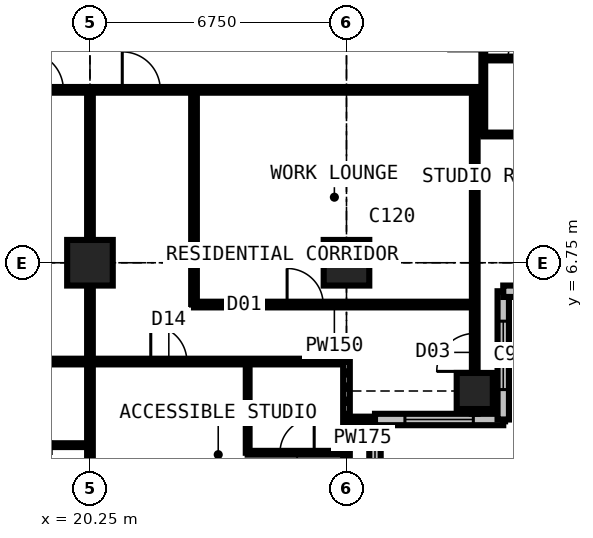
"""IFC4 building model, lengths in metres.
Left out: names, types, materials, properties, quantities, classifications, styles, units other than length and angle.
Written with IfcOpenShell. Run it as: python <this file> out.ifc"""

import sys

from ifc_helpers import new_model, si_unit, direction, frame, frame_2d, origin, origin_2d, place, context, subcontext, project, spatial, rectangle, extrude, element, fill, save


model = new_model("IFC4")
c1 = context("Model", 3, precision=1e-05, world=origin(), true_north=direction((0.0, 1.0)))
c2 = subcontext(c1, "Body", "Model", "MODEL_VIEW")
j1 = project(units=[si_unit("LENGTHUNIT", "METRE"), si_unit("PLANEANGLEUNIT", "RADIAN")], contexts=[c1])
p1 = place(None, origin())
s1 = spatial("IfcSite", under=j1, at=p1, CompositionType="ELEMENT")
p2 = place(p1, origin())
s2 = spatial("IfcBuilding", under=s1, at=p2, CompositionType="ELEMENT")
p3 = place(p2, frame((0.0, 0.0, 174.6)))
s3 = spatial("IfcBuildingStorey", under=s2, at=p3, CompositionType="ELEMENT", Elevation=174.6)
for number, where, z_axis, x_axis in (
    (1, (20.25, 6.75, 0.0), (0.0, 0.0, 1.0), (1.0, 0.0, 0.0)),
    (2, (27.0, 6.75, 0.0), (0.0, 0.0, 1.0), (1.0, 0.0, 0.0)),
):
    element("IfcColumn", number, at=place(p3, frame(where, z_axis=z_axis, x_axis=x_axis)), inside=s3, PredefinedType="COLUMN", context=c2, shape_type="SweptSolid", body=[
        extrude(rectangle(XDim=1.2, YDim=1.2, at=origin_2d()), origin(), (0.0, 0.0, 1.0), 3.6),
    ])
p4 = place(p3, frame((30.375, 3.375, 0.0), z_axis=(0.0, 0.0, 1.0), x_axis=(1.0, 0.0, 0.0)))
e3 = element("IfcColumn", 3, at=p4, inside=s3, PredefinedType="COLUMN", context=c2, shape_type="SweptSolid", body=[
    extrude(rectangle(XDim=0.95, YDim=0.95, at=origin_2d()), origin(), (0.0, 0.0, 1.0), 3.6),
])
p5 = place(p3, frame((27.75, -0.75, 0.0), z_axis=(0.0, 0.0, 1.0), x_axis=(0.0, 1.0, 0.0)))
e4 = element("IfcWall", 4, at=p5, inside=s3, PredefinedType="SOLIDWALL", context=c2, shape_type="SweptSolid", body=[
    extrude(rectangle(XDim=3.375, YDim=0.3, at=frame_2d((1.688, 0.0))), origin(), (0.0, 0.0, 1.0), 3.375),
])
p6 = place(p5, frame((0.788, 0.0, 0.6)))
e5 = element("IfcOpeningElement", 5, at=p6, cuts=e4, PredefinedType="OPENING", context=c2, shape_type="SweptSolid", body=[
    extrude(rectangle(XDim=1.8, YDim=2.1, at=frame_2d((0.9, 1.05))), frame((0.0, 0.16, 0.0), z_axis=(0.0, -1.0, 0.0), x_axis=(1.0, 0.0, 0.0)), (0.0, 0.0, 1.0), 0.32),
])
p7 = place(p3, frame((27.75, 2.625, 0.0), z_axis=(0.0, 0.0, 1.0), x_axis=(1.0, 0.0, 0.0)))
e6 = element("IfcWall", 6, at=p7, inside=s3, PredefinedType="SOLIDWALL", context=c2, shape_type="SweptSolid", body=[
    extrude(rectangle(XDim=3.375, YDim=0.3, at=frame_2d((1.688, 0.0))), origin(), (0.0, 0.0, 1.0), 3.375),
])
p8 = place(p7, frame((0.788, 0.0, 0.6)))
e7 = element("IfcOpeningElement", 7, at=p8, cuts=e6, PredefinedType="OPENING", context=c2, shape_type="SweptSolid", body=[
    extrude(rectangle(XDim=1.8, YDim=2.1, at=frame_2d((0.9, 1.05))), frame((0.0, 0.16, 0.0), z_axis=(0.0, -1.0, 0.0), x_axis=(1.0, 0.0, 0.0)), (0.0, 0.0, 1.0), 0.32),
])
p9 = place(p3, frame((31.125, 2.625, 0.0), z_axis=(0.0, 0.0, 1.0), x_axis=(0.0, 1.0, 0.0)))
e8 = element("IfcWall", 8, at=p9, inside=s3, PredefinedType="SOLIDWALL", context=c2, shape_type="SweptSolid", body=[
    extrude(rectangle(XDim=3.375, YDim=0.3, at=frame_2d((1.688, 0.0))), origin(), (0.0, 0.0, 1.0), 3.375),
])
p10 = place(p9, frame((0.788, 0.0, 0.6)))
e9 = element("IfcOpeningElement", 9, at=p10, cuts=e8, PredefinedType="OPENING", context=c2, shape_type="SweptSolid", body=[
    extrude(rectangle(XDim=1.8, YDim=2.1, at=frame_2d((0.9, 1.05))), frame((0.0, 0.16, 0.0), z_axis=(0.0, -1.0, 0.0), x_axis=(1.0, 0.0, 0.0)), (0.0, 0.0, 1.0), 0.32),
])
p11 = place(p3, frame((31.125, 6.0, 0.0), z_axis=(0.0, 0.0, 1.0), x_axis=(1.0, 0.0, 0.0)))
e10 = element("IfcWall", 10, at=p11, inside=s3, PredefinedType="SOLIDWALL", context=c2, shape_type="SweptSolid", body=[
    extrude(rectangle(XDim=3.375, YDim=0.3, at=frame_2d((1.688, 0.0))), origin(), (0.0, 0.0, 1.0), 3.375),
])
p12 = place(p11, frame((0.788, 0.0, 0.6)))
e11 = element("IfcOpeningElement", 11, at=p12, cuts=e10, PredefinedType="OPENING", context=c2, shape_type="SweptSolid", body=[
    extrude(rectangle(XDim=1.8, YDim=2.1, at=frame_2d((0.9, 1.05))), frame((0.0, 0.16, 0.0), z_axis=(0.0, -1.0, 0.0), x_axis=(1.0, 0.0, 0.0)), (0.0, 0.0, 1.0), 0.32),
])
p13 = place(p3, frame((6.75, 4.15, 0.0), z_axis=(0.0, 0.0, 1.0), x_axis=(1.0, 0.0, 0.0)))
e12 = element("IfcWall", 12, at=p13, inside=s3, PredefinedType="PARTITIONING", context=c2, shape_type="SweptSolid", body=[
    extrude(rectangle(XDim=20.25, YDim=0.15, at=frame_2d((10.125, 0.0))), origin(), (0.0, 0.0, 1.0), 3.375),
])
p14 = place(p13, frame((1.2, 0.0, 0.0)))
e13 = element("IfcOpeningElement", 13, at=p14, cuts=e12, PredefinedType="OPENING", context=c2, shape_type="SweptSolid", body=[
    extrude(rectangle(XDim=1.0, YDim=2.2, at=frame_2d((0.5, 1.1))), frame((0.0, 0.085, 0.0), z_axis=(0.0, -1.0, 0.0), x_axis=(1.0, 0.0, 0.0)), (0.0, 0.0, 1.0), 0.17),
])
p15 = place(p13, frame((3.575, 0.0, 0.0)))
e14 = element("IfcOpeningElement", 14, at=p15, cuts=e12, PredefinedType="OPENING", context=c2, shape_type="SweptSolid", body=[
    extrude(rectangle(XDim=0.95, YDim=2.2, at=frame_2d((0.475, 1.1))), frame((0.0, 0.085, 0.0), z_axis=(0.0, -1.0, 0.0), x_axis=(1.0, 0.0, 0.0)), (0.0, 0.0, 1.0), 0.17),
])
p16 = place(p13, frame((7.0, 0.0, 0.0)))
e15 = element("IfcOpeningElement", 15, at=p16, cuts=e12, PredefinedType="OPENING", context=c2, shape_type="SweptSolid", body=[
    extrude(rectangle(XDim=0.95, YDim=2.2, at=frame_2d((0.475, 1.1))), frame((0.0, 0.085, 0.0), z_axis=(0.0, -1.0, 0.0), x_axis=(1.0, 0.0, 0.0)), (0.0, 0.0, 1.0), 0.17),
])
p17 = place(p13, frame((10.375, 0.0, 0.0)))
e16 = element("IfcOpeningElement", 16, at=p17, cuts=e12, PredefinedType="OPENING", context=c2, shape_type="SweptSolid", body=[
    extrude(rectangle(XDim=0.95, YDim=2.2, at=frame_2d((0.475, 1.1))), frame((0.0, 0.085, 0.0), z_axis=(0.0, -1.0, 0.0), x_axis=(1.0, 0.0, 0.0)), (0.0, 0.0, 1.0), 0.17),
])
p18 = place(p13, frame((15.1, 0.0, 0.0)))
e17 = element("IfcOpeningElement", 17, at=p18, cuts=e12, PredefinedType="OPENING", context=c2, shape_type="SweptSolid", body=[
    extrude(rectangle(XDim=0.95, YDim=2.2, at=frame_2d((0.475, 1.1))), frame((0.0, 0.085, 0.0), z_axis=(0.0, -1.0, 0.0), x_axis=(1.0, 0.0, 0.0)), (0.0, 0.0, 1.0), 0.17),
])
p19 = place(p3, frame((10.125, 11.3, 0.0), z_axis=(0.0, 0.0, 1.0), x_axis=(1.0, 0.0, 0.0)))
e18 = element("IfcWall", 18, at=p19, inside=s3, PredefinedType="PARTITIONING", context=c2, shape_type="SweptSolid", body=[
    extrude(rectangle(XDim=20.475, YDim=0.15, at=frame_2d((10.238, 0.0))), origin(), (0.0, 0.0, 1.0), 3.375),
])
p20 = place(p19, frame((8.425, 0.0, 0.0)))
e19 = element("IfcOpeningElement", 19, at=p20, cuts=e18, PredefinedType="OPENING", context=c2, shape_type="SweptSolid", body=[
    extrude(rectangle(XDim=1.0, YDim=2.2, at=frame_2d((0.5, 1.1))), frame((0.0, 0.085, 0.0), z_axis=(0.0, -1.0, 0.0), x_axis=(1.0, 0.0, 0.0)), (0.0, 0.0, 1.0), 0.17),
])
p21 = place(p19, frame((10.975, 0.0, 0.0)))
e20 = element("IfcOpeningElement", 20, at=p21, cuts=e18, PredefinedType="OPENING", context=c2, shape_type="SweptSolid", body=[
    extrude(rectangle(XDim=1.0, YDim=2.2, at=frame_2d((0.5, 1.1))), frame((0.0, 0.085, 0.0), z_axis=(0.0, -1.0, 0.0), x_axis=(1.0, 0.0, 0.0)), (0.0, 0.0, 1.0), 0.17),
])
p22 = place(p19, frame((4.875, 0.0, 0.0)))
e21 = element("IfcOpeningElement", 21, at=p22, cuts=e18, PredefinedType="OPENING", context=c2, shape_type="SweptSolid", body=[
    extrude(rectangle(XDim=0.95, YDim=2.2, at=frame_2d((0.475, 1.1))), frame((0.0, 0.085, 0.0), z_axis=(0.0, -1.0, 0.0), x_axis=(1.0, 0.0, 0.0)), (0.0, 0.0, 1.0), 0.17),
])
p23 = place(p3, frame((18.25, 1.95, 0.0), z_axis=(0.0, 0.0, 1.0), x_axis=(1.0, 0.0, 0.0)))
e22 = element("IfcWall", 22, at=p23, inside=s3, PredefinedType="PARTITIONING", context=c2, shape_type="SweptSolid", body=[
    extrude(rectangle(XDim=2.0, YDim=0.1, at=frame_2d((1.0, 0.0))), origin(), (0.0, 0.0, 1.0), 3.375),
])
p24 = place(p3, frame((20.25, -0.734, 0.0), z_axis=(0.0, 0.0, 1.0), x_axis=(0.0, 1.0, 0.0)))
e23 = element("IfcWall", 23, at=p24, inside=s3, PredefinedType="PARTITIONING", context=c2, shape_type="SweptSolid", body=[
    extrude(rectangle(XDim=12.034, YDim=0.15, at=frame_2d((6.017, 0.0))), origin(), (0.0, 0.0, 1.0), 2.61),
])
p25 = place(p3, frame((22.988, 5.65, 0.0), z_axis=(0.0, 0.0, 1.0), x_axis=(1.0, 0.0, 0.0)))
e24 = element("IfcWall", 24, at=p25, inside=s3, PredefinedType="PARTITIONING", context=c2, shape_type="SweptSolid", body=[
    extrude(rectangle(XDim=7.387, YDim=0.15, at=frame_2d((3.694, 0.0))), origin(), (0.0, 0.0, 1.0), 3.375),
])
p26 = place(p25, frame((2.45, 0.0, 0.0)))
e25 = element("IfcOpeningElement", 25, at=p26, cuts=e24, PredefinedType="OPENING", context=c2, shape_type="SweptSolid", body=[
    extrude(rectangle(XDim=0.95, YDim=2.2, at=frame_2d((0.475, 1.1))), frame((0.0, 0.085, 0.0), z_axis=(0.0, -1.0, 0.0), x_axis=(1.0, 0.0, 0.0)), (0.0, 0.0, 1.0), 0.17),
])
p27 = place(p3, frame((22.988, 5.65, 0.0), z_axis=(0.0, 0.0, 1.0), x_axis=(0.0, 1.0, 0.0)))
e26 = element("IfcWall", 26, at=p27, inside=s3, PredefinedType="PARTITIONING", context=c2, shape_type="SweptSolid", body=[
    extrude(rectangle(XDim=5.65, YDim=0.15, at=frame_2d((2.825, 0.0))), origin(), (0.0, 0.0, 1.0), 3.375),
])
p28 = place(p3, frame((24.4, 1.75, 0.0), z_axis=(0.0, 0.0, 1.0), x_axis=(0.0, 1.0, 0.0)))
e27 = element("IfcWall", 27, at=p28, inside=s3, PredefinedType="PARTITIONING", context=c2, shape_type="SweptSolid", body=[
    extrude(rectangle(XDim=2.4, YDim=0.1, at=frame_2d((1.2, 0.0))), origin(), (0.0, 0.0, 1.0), 3.375),
])
p29 = place(p3, frame((24.4, 1.75, 0.0), z_axis=(0.0, 0.0, 1.0), x_axis=(1.0, 0.0, 0.0)))
e28 = element("IfcWall", 28, at=p29, inside=s3, PredefinedType="PARTITIONING", context=c2, shape_type="SweptSolid", body=[
    extrude(rectangle(XDim=2.6, YDim=0.1, at=frame_2d((1.3, 0.0))), origin(), (0.0, 0.0, 1.0), 3.375),
])
p30 = place(p29, frame((0.85, 0.0, 0.0)))
e29 = element("IfcOpeningElement", 29, at=p30, cuts=e28, PredefinedType="OPENING", context=c2, shape_type="SweptSolid", body=[
    extrude(rectangle(XDim=0.9, YDim=2.2, at=frame_2d((0.45, 1.1))), frame((0.0, 0.06, 0.0), z_axis=(0.0, -1.0, 0.0), x_axis=(1.0, 0.0, 0.0)), (0.0, 0.0, 1.0), 0.12),
])
p31 = place(p3, frame((27.0, -0.734, 0.0), z_axis=(0.0, 0.0, 1.0), x_axis=(0.0, 1.0, 0.0)))
e30 = element("IfcWall", 30, at=p31, inside=s3, PredefinedType="PARTITIONING", context=c2, shape_type="SweptSolid", body=[
    extrude(rectangle(XDim=4.884, YDim=0.175, at=frame_2d((2.442, 0.0))), origin(), (0.0, 0.0, 1.0), 2.877),
])
p32 = place(p3, frame((27.0, 2.625, 0.0), z_axis=(0.0, 0.0, 1.0), x_axis=(1.0, 0.0, 0.0)))
e31 = element("IfcWall", 31, at=p32, inside=s3, PredefinedType="PARTITIONING", context=c2, shape_type="SweptSolid", body=[
    extrude(rectangle(XDim=0.734, YDim=0.15, at=frame_2d((0.367, 0.0))), origin(), (0.0, 0.0, 1.0), 3.375),
])
p33 = place(p3, frame((30.375, 2.775, 0.0), z_axis=(0.0, 0.0, 1.0), x_axis=(0.0, 1.0, 0.0)))
e32 = element("IfcWall", 32, at=p33, inside=s3, PredefinedType="PARTITIONING", context=c2, shape_type="SweptSolid", body=[
    extrude(rectangle(XDim=8.525, YDim=0.15, at=frame_2d((4.263, 0.0))), origin(), (0.0, 0.0, 1.0), 2.877),
])
p34 = place(p33, frame((1.116, 0.0, 0.0)))
e33 = element("IfcOpeningElement", 33, at=p34, cuts=e32, PredefinedType="OPENING", context=c2, shape_type="SweptSolid", body=[
    extrude(rectangle(XDim=1.0, YDim=2.2, at=frame_2d((0.5, 1.1))), frame((0.0, 0.085, 0.0), z_axis=(0.0, -1.0, 0.0), x_axis=(1.0, 0.0, 0.0)), (0.0, 0.0, 1.0), 0.17),
])
p35 = place(p3, frame((30.6, 10.125, 0.0), z_axis=(0.0, 0.0, 1.0), x_axis=(0.0, 1.0, 0.0)))
e34 = element("IfcWall", 34, at=p35, inside=s3, PredefinedType="PARTITIONING", context=c2, shape_type="SweptSolid", body=[
    extrude(rectangle(XDim=3.375, YDim=0.1, at=frame_2d((1.688, 0.0))), origin(), (0.0, 0.0, 1.0), 3.375),
])
p36 = place(p35, frame((2.2, 0.0, 0.0)))
e35 = element("IfcOpeningElement", 35, at=p36, cuts=e34, PredefinedType="OPENING", context=c2, shape_type="SweptSolid", body=[
    extrude(rectangle(XDim=0.95, YDim=2.2, at=frame_2d((0.475, 1.1))), frame((0.0, 0.06, 0.0), z_axis=(0.0, -1.0, 0.0), x_axis=(1.0, 0.0, 0.0)), (0.0, 0.0, 1.0), 0.12),
])
p37 = place(p3, frame((30.6, 10.125, 0.0), z_axis=(0.0, 0.0, 1.0), x_axis=(1.0, 0.0, 0.0)))
e36 = element("IfcWall", 36, at=p37, inside=s3, PredefinedType="PARTITIONING", context=c2, shape_type="SweptSolid", body=[
    extrude(rectangle(XDim=3.884, YDim=0.1, at=frame_2d((1.942, 0.0))), origin(), (0.0, 0.0, 1.0), 3.375),
])
p38 = place(p3, frame((30.6, 12.125, 0.0), z_axis=(0.0, 0.0, 1.0), x_axis=(1.0, 0.0, 0.0)))
e37 = element("IfcWall", 37, at=p38, inside=s3, PredefinedType="PARTITIONING", context=c2, shape_type="SweptSolid", body=[
    extrude(rectangle(XDim=2.2, YDim=0.1, at=frame_2d((1.1, 0.0))), origin(), (0.0, 0.0, 1.0), 3.375),
])
p39 = place(p38, frame((0.65, 0.0, 0.0)))
e38 = element("IfcOpeningElement", 38, at=p39, cuts=e37, PredefinedType="OPENING", context=c2, shape_type="SweptSolid", body=[
    extrude(rectangle(XDim=0.9, YDim=2.2, at=frame_2d((0.45, 1.1))), frame((0.0, 0.06, 0.0), z_axis=(0.0, -1.0, 0.0), x_axis=(1.0, 0.0, 0.0)), (0.0, 0.0, 1.0), 0.12),
])
p40 = place(p6, origin())
e39 = element("IfcWindow", 39, at=p40, inside=s3, PartitioningType="SINGLE_PANEL", PredefinedType="WINDOW", context=c2, shape_type="SweptSolid", body=[
    extrude(rectangle(XDim=1.8, YDim=2.1, at=frame_2d((0.9, 1.05))), frame((0.0, 0.03, 0.0), z_axis=(0.0, -1.0, 0.0), x_axis=(1.0, 0.0, 0.0)), (0.0, 0.0, 1.0), 0.06),
])
fill(e5, e39)
p41 = place(p8, origin())
e40 = element("IfcWindow", 40, at=p41, inside=s3, PartitioningType="SINGLE_PANEL", PredefinedType="WINDOW", context=c2, shape_type="SweptSolid", body=[
    extrude(rectangle(XDim=1.8, YDim=2.1, at=frame_2d((0.9, 1.05))), frame((0.0, 0.03, 0.0), z_axis=(0.0, -1.0, 0.0), x_axis=(1.0, 0.0, 0.0)), (0.0, 0.0, 1.0), 0.06),
])
fill(e7, e40)
p42 = place(p10, origin())
e41 = element("IfcWindow", 41, at=p42, inside=s3, PartitioningType="SINGLE_PANEL", PredefinedType="WINDOW", context=c2, shape_type="SweptSolid", body=[
    extrude(rectangle(XDim=1.8, YDim=2.1, at=frame_2d((0.9, 1.05))), frame((0.0, 0.03, 0.0), z_axis=(0.0, -1.0, 0.0), x_axis=(1.0, 0.0, 0.0)), (0.0, 0.0, 1.0), 0.06),
])
fill(e9, e41)
p43 = place(p20, origin())
e42 = element("IfcDoor", 42, at=p43, inside=s3, OperationType="SINGLE_SWING_LEFT", PredefinedType="DOOR", context=c2, shape_type="SweptSolid", body=[
    extrude(rectangle(XDim=1.0, YDim=2.2, at=frame_2d((0.5, 1.1))), frame((0.0, 0.025, 0.0), z_axis=(0.0, -1.0, 0.0), x_axis=(1.0, 0.0, 0.0)), (0.0, 0.0, 1.0), 0.05),
])
fill(e19, e42)
p44 = place(p18, origin())
e43 = element("IfcDoor", 43, at=p44, inside=s3, OperationType="SINGLE_SWING_LEFT", PredefinedType="DOOR", context=c2, shape_type="SweptSolid", body=[
    extrude(rectangle(XDim=0.95, YDim=2.2, at=frame_2d((0.475, 1.1))), frame((0.0, 0.025, 0.0), z_axis=(0.0, -1.0, 0.0), x_axis=(1.0, 0.0, 0.0)), (0.0, 0.0, 1.0), 0.05),
])
fill(e17, e43)
p45 = place(p30, origin())
e44 = element("IfcDoor", 44, at=p45, inside=s3, OperationType="SINGLE_SWING_RIGHT", PredefinedType="DOOR", context=c2, shape_type="SweptSolid", body=[
    extrude(rectangle(XDim=0.9, YDim=2.2, at=frame_2d((0.45, 1.1))), frame((0.0, 0.025, 0.0), z_axis=(0.0, -1.0, 0.0), x_axis=(1.0, 0.0, 0.0)), (0.0, 0.0, 1.0), 0.05),
])
fill(e29, e44)
p46 = place(p21, origin())
e45 = element("IfcDoor", 45, at=p46, inside=s3, OperationType="SINGLE_SWING_LEFT", PredefinedType="DOOR", context=c2, shape_type="SweptSolid", body=[
    extrude(rectangle(XDim=1.0, YDim=2.2, at=frame_2d((0.5, 1.1))), frame((0.0, 0.025, 0.0), z_axis=(0.0, -1.0, 0.0), x_axis=(1.0, 0.0, 0.0)), (0.0, 0.0, 1.0), 0.05),
])
fill(e20, e45)
p47 = place(p26, origin())
e46 = element("IfcDoor", 46, at=p47, inside=s3, OperationType="SINGLE_SWING_LEFT", PredefinedType="DOOR", context=c2, shape_type="SweptSolid", body=[
    extrude(rectangle(XDim=0.95, YDim=2.2, at=frame_2d((0.475, 1.1))), frame((0.0, 0.025, 0.0), z_axis=(0.0, -1.0, 0.0), x_axis=(1.0, 0.0, 0.0)), (0.0, 0.0, 1.0), 0.05),
])
fill(e25, e46)
p48 = place(p34, origin())
e47 = element("IfcDoor", 47, at=p48, inside=s3, OperationType="SINGLE_SWING_LEFT", PredefinedType="DOOR", context=c2, shape_type="SweptSolid", body=[
    extrude(rectangle(XDim=1.0, YDim=2.2, at=frame_2d((0.5, 1.1))), frame((0.0, 0.025, 0.0), z_axis=(0.0, -1.0, 0.0), x_axis=(1.0, 0.0, 0.0)), (0.0, 0.0, 1.0), 0.05),
])
fill(e33, e47)
p49 = place(p39, origin())
e48 = element("IfcDoor", 48, at=p49, inside=s3, OperationType="SINGLE_SWING_RIGHT", PredefinedType="DOOR", context=c2, shape_type="SweptSolid", body=[
    extrude(rectangle(XDim=0.9, YDim=2.2, at=frame_2d((0.45, 1.1))), frame((0.0, 0.025, 0.0), z_axis=(0.0, -1.0, 0.0), x_axis=(1.0, 0.0, 0.0)), (0.0, 0.0, 1.0), 0.05),
])
fill(e38, e48)
save(model, sys.argv[1])
